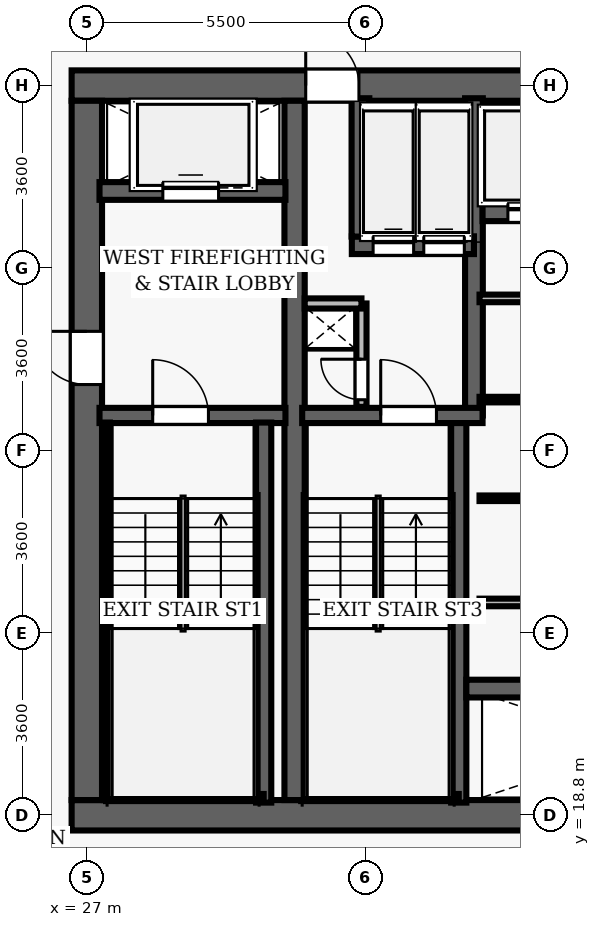
"""IFC4 building model, lengths in metres.
Left out: names, types, materials, properties, quantities, classifications, styles, units other than length and angle.
Written with IfcOpenShell. Run it as: python <this file> out.ifc"""

import sys

from ifc_helpers import new_model, si_unit, direction, frame, frame_2d, origin, place, context, subcontext, project, spatial, rectangle, extrude, element, fill, save


model = new_model("IFC4")
c1 = context("Model", 3, precision=1e-05, world=origin(), true_north=direction((0.0, 1.0)))
c2 = subcontext(c1, "Body", "Model", "MODEL_VIEW")
j1 = project(units=[si_unit("LENGTHUNIT", "METRE"), si_unit("PLANEANGLEUNIT", "RADIAN")], contexts=[c1])
p1 = place(None, origin())
s1 = spatial("IfcSite", under=j1, at=p1, CompositionType="ELEMENT")
p2 = place(p1, origin())
s2 = spatial("IfcBuilding", under=s1, at=p2, CompositionType="ELEMENT")
p3 = place(p2, frame((0.0, 0.0, 48.4)))
s3 = spatial("IfcBuildingStorey", under=s2, at=p3, CompositionType="ELEMENT", Elevation=48.4)
p4 = place(p3, frame((26.7, 18.8, 0.0), z_axis=(0.0, 0.0, 1.0), x_axis=(1.0, 0.0, 0.0)))
e1 = element("IfcWall", 1, at=p4, inside=s3, PredefinedType="SHEAR", context=c2, shape_type="SweptSolid", body=[
    extrude(rectangle(XDim=22.6, YDim=0.6, at=frame_2d((11.3, 0.0))), origin(), (0.0, 0.0, 1.0), 3.5),
])
p5 = place(p4, frame((14.52, 0.0, 0.0)))
e2 = element("IfcOpeningElement", 2, at=p5, cuts=e1, PredefinedType="OPENING", context=c2, shape_type="SweptSolid", body=[
    extrude(rectangle(XDim=1.05, YDim=2.15, at=frame_2d((0.525, 1.075))), frame((0.0, 0.31, 0.0), z_axis=(0.0, -1.0, 0.0), x_axis=(1.0, 0.0, 0.0)), (0.0, 0.0, 1.0), 0.62),
])
p6 = place(p3, frame((26.7, 33.2, 0.0), z_axis=(0.0, 0.0, 1.0), x_axis=(1.0, 0.0, 0.0)))
e3 = element("IfcWall", 3, at=p6, inside=s3, PredefinedType="SHEAR", context=c2, shape_type="SweptSolid", body=[
    extrude(rectangle(XDim=22.6, YDim=0.6, at=frame_2d((11.3, 0.0))), origin(), (0.0, 0.0, 1.0), 3.5),
])
p7 = place(p6, frame((4.62, 0.0, 0.0)))
e4 = element("IfcOpeningElement", 4, at=p7, cuts=e3, PredefinedType="OPENING", context=c2, shape_type="SweptSolid", body=[
    extrude(rectangle(XDim=1.05, YDim=2.15, at=frame_2d((0.525, 1.075))), frame((0.0, 0.31, 0.0), z_axis=(0.0, -1.0, 0.0), x_axis=(1.0, 0.0, 0.0)), (0.0, 0.0, 1.0), 0.62),
])
p8 = place(p6, frame((14.52, 0.0, 0.0)))
e5 = element("IfcOpeningElement", 5, at=p8, cuts=e3, PredefinedType="OPENING", context=c2, shape_type="SweptSolid", body=[
    extrude(rectangle(XDim=1.05, YDim=2.15, at=frame_2d((0.525, 1.075))), frame((0.0, 0.31, 0.0), z_axis=(0.0, -1.0, 0.0), x_axis=(1.0, 0.0, 0.0)), (0.0, 0.0, 1.0), 0.62),
])
p9 = place(p3, frame((27.0, 19.1, 0.0), z_axis=(0.0, 0.0, 1.0), x_axis=(0.0, 1.0, 0.0)))
e6 = element("IfcWall", 6, at=p9, inside=s3, PredefinedType="SHEAR", context=c2, shape_type="SweptSolid", body=[
    extrude(rectangle(XDim=13.8, YDim=0.6, at=frame_2d((6.9, 0.0))), origin(), (0.0, 0.0, 1.0), 3.5),
])
p10 = place(p9, frame((8.2, 0.0, 0.0)))
e7 = element("IfcOpeningElement", 7, at=p10, cuts=e6, PredefinedType="OPENING", context=c2, shape_type="SweptSolid", body=[
    extrude(rectangle(XDim=1.05, YDim=2.15, at=frame_2d((0.525, 1.075))), frame((0.0, 0.31, 0.0), z_axis=(0.0, -1.0, 0.0), x_axis=(1.0, 0.0, 0.0)), (0.0, 0.0, 1.0), 0.62),
])
p11 = place(p3, frame((31.1, 19.1, 0.0), z_axis=(0.0, 0.0, 1.0), x_axis=(0.0, 1.0, 0.0)))
e8 = element("IfcWall", 8, at=p11, inside=s3, PredefinedType="SHEAR", context=c2, shape_type="SweptSolid", body=[
    extrude(rectangle(XDim=13.8, YDim=0.4, at=frame_2d((6.9, 0.0))), origin(), (0.0, 0.0, 1.0), 3.5),
])
p12 = place(p3, frame((27.25, 26.69, 0.0), z_axis=(0.0, 0.0, 1.0), x_axis=(1.0, 0.0, 0.0)))
e9 = element("IfcWall", 9, at=p12, inside=s3, PredefinedType="SHEAR", context=c2, shape_type="SweptSolid", body=[
    extrude(rectangle(XDim=3.67, YDim=0.3, at=frame_2d((1.835, 0.0))), origin(), (0.0, 0.0, 1.0), 3.5),
])
p13 = place(p12, frame((1.05, 0.0, 0.0)))
e10 = element("IfcOpeningElement", 10, at=p13, cuts=e9, PredefinedType="OPENING", context=c2, shape_type="SweptSolid", body=[
    extrude(rectangle(XDim=1.1, YDim=2.15, at=frame_2d((0.55, 1.075))), frame((0.0, 0.16, 0.0), z_axis=(0.0, -1.0, 0.0), x_axis=(1.0, 0.0, 0.0)), (0.0, 0.0, 1.0), 0.32),
])
p14 = place(p3, frame((30.49, 19.05, 0.0), z_axis=(0.0, 0.0, 1.0), x_axis=(0.0, 1.0, 0.0)))
e11 = element("IfcWall", 11, at=p14, inside=s3, PredefinedType="SHEAR", context=c2, shape_type="SweptSolid", body=[
    extrude(rectangle(XDim=7.5, YDim=0.3, at=frame_2d((3.75, 0.0))), origin(), (0.0, 0.0, 1.0), 3.5),
])
p15 = place(p3, frame((27.395, 19.1, 0.0), z_axis=(0.0, 0.0, 1.0), x_axis=(0.0, 1.0, 0.0)))
e12 = element("IfcWall", 12, at=p15, inside=s3, PredefinedType="SHEAR", context=c2, shape_type="SweptSolid", body=[
    extrude(rectangle(XDim=7.45, YDim=0.12, at=frame_2d((3.725, 0.0))), origin(), (0.0, 0.0, 1.0), 3.5),
])
p16 = place(p3, frame((27.395, 19.16, 0.0), z_axis=(0.0, 0.0, 1.0), x_axis=(1.0, 0.0, 0.0)))
e13 = element("IfcWall", 13, at=p16, inside=s3, PredefinedType="SHEAR", context=c2, shape_type="SweptSolid", body=[
    extrude(rectangle(XDim=3.095, YDim=0.12, at=frame_2d((1.547, 0.0))), origin(), (0.0, 0.0, 1.0), 3.5),
])
p17 = place(p3, frame((27.25, 31.12, 0.0), z_axis=(0.0, 0.0, 1.0), x_axis=(1.0, 0.0, 0.0)))
e14 = element("IfcWall", 14, at=p17, inside=s3, PredefinedType="SHEAR", context=c2, shape_type="SweptSolid", body=[
    extrude(rectangle(XDim=3.67, YDim=0.35, at=frame_2d((1.835, 0.0))), origin(), (0.0, 0.0, 1.0), 2.6),
])
p18 = place(p17, frame((1.25, 0.0, 0.0)))
e15 = element("IfcOpeningElement", 15, at=p18, cuts=e14, PredefinedType="OPENING", context=c2, shape_type="SweptSolid", body=[
    extrude(rectangle(XDim=1.1, YDim=2.15, at=frame_2d((0.55, 1.075))), frame((0.0, 0.185, 0.0), z_axis=(0.0, -1.0, 0.0), x_axis=(1.0, 0.0, 0.0)), (0.0, 0.0, 1.0), 0.37),
])
p19 = place(p3, frame((34.34, 19.05, 0.0), z_axis=(0.0, 0.0, 1.0), x_axis=(0.0, 1.0, 0.0)))
e16 = element("IfcWall", 16, at=p19, inside=s3, PredefinedType="SHEAR", context=c2, shape_type="SweptSolid", body=[
    extrude(rectangle(XDim=7.5, YDim=0.3, at=frame_2d((3.75, 0.0))), origin(), (0.0, 0.0, 1.0), 3.5),
])
p20 = place(p3, frame((34.64, 26.69, 0.0), z_axis=(0.0, 0.0, 1.0), x_axis=(0.0, 1.0, 0.0)))
e17 = element("IfcWall", 17, at=p20, inside=s3, PredefinedType="SHEAR", context=c2, shape_type="SweptSolid", body=[
    extrude(rectangle(XDim=6.26, YDim=0.35, at=frame_2d((3.13, 0.0))), origin(), (0.0, 0.0, 1.0), 3.5),
])
p21 = place(p3, frame((31.25, 26.69, 0.0), z_axis=(0.0, 0.0, 1.0), x_axis=(1.0, 0.0, 0.0)))
e18 = element("IfcWall", 18, at=p21, inside=s3, PredefinedType="SHEAR", context=c2, shape_type="SweptSolid", body=[
    extrude(rectangle(XDim=3.56, YDim=0.3, at=frame_2d((1.78, 0.0))), origin(), (0.0, 0.0, 1.0), 3.5),
])
p22 = place(p21, frame((1.55, 0.0, 0.0)))
e19 = element("IfcOpeningElement", 19, at=p22, cuts=e18, PredefinedType="OPENING", context=c2, shape_type="SweptSolid", body=[
    extrude(rectangle(XDim=1.1, YDim=2.15, at=frame_2d((0.55, 1.075))), frame((0.0, 0.16, 0.0), z_axis=(0.0, -1.0, 0.0), x_axis=(1.0, 0.0, 0.0)), (0.0, 0.0, 1.0), 0.32),
])
p23 = place(p3, frame((31.3, 19.16, 0.0), z_axis=(0.0, 0.0, 1.0), x_axis=(1.0, 0.0, 0.0)))
e20 = element("IfcWall", 20, at=p23, inside=s3, PredefinedType="SHEAR", context=c2, shape_type="SweptSolid", body=[
    extrude(rectangle(XDim=3.04, YDim=0.12, at=frame_2d((1.52, 0.0))), origin(), (0.0, 0.0, 1.0), 3.5),
])
p24 = place(p3, frame((32.23, 30.05, 0.0), z_axis=(0.0, 0.0, 1.0), x_axis=(1.0, 0.0, 0.0)))
e21 = element("IfcWall", 21, at=p24, inside=s3, PredefinedType="SHEAR", context=c2, shape_type="SweptSolid", body=[
    extrude(rectangle(XDim=2.41, YDim=0.35, at=frame_2d((1.205, 0.0))), origin(), (0.0, 0.0, 1.0), 2.6),
])
p25 = place(p24, frame((0.42, 0.0, 0.0)))
e22 = element("IfcOpeningElement", 22, at=p25, cuts=e21, PredefinedType="OPENING", context=c2, shape_type="SweptSolid", body=[
    extrude(rectangle(XDim=0.8, YDim=2.15, at=frame_2d((0.4, 1.075))), frame((0.0, 0.185, 0.0), z_axis=(0.0, -1.0, 0.0), x_axis=(1.0, 0.0, 0.0)), (0.0, 0.0, 1.0), 0.37),
])
p26 = place(p24, frame((1.42, 0.0, 0.0)))
e23 = element("IfcOpeningElement", 23, at=p26, cuts=e21, PredefinedType="OPENING", context=c2, shape_type="SweptSolid", body=[
    extrude(rectangle(XDim=0.8, YDim=2.15, at=frame_2d((0.4, 1.075))), frame((0.0, 0.185, 0.0), z_axis=(0.0, -1.0, 0.0), x_axis=(1.0, 0.0, 0.0)), (0.0, 0.0, 1.0), 0.37),
])
p27 = place(p3, frame((32.4, 30.22, 0.0), z_axis=(0.0, 0.0, 1.0), x_axis=(0.0, 1.0, 0.0)))
e24 = element("IfcWall", 24, at=p27, inside=s3, PredefinedType="SHEAR", context=c2, shape_type="SweptSolid", body=[
    extrude(rectangle(XDim=2.73, YDim=0.35, at=frame_2d((1.365, 0.0))), origin(), (0.0, 0.0, 1.0), 2.6),
])
p28 = place(p3, frame((32.42, 26.86, 0.0), z_axis=(0.0, 0.0, 1.0), x_axis=(0.0, 1.0, 0.0)))
e25 = element("IfcWall", 25, at=p28, inside=s3, PredefinedType="PARTITIONING", context=c2, shape_type="SweptSolid", body=[
    extrude(rectangle(XDim=2.04, YDim=0.2, at=frame_2d((1.02, 0.0))), origin(), (0.0, 0.0, 1.0), 2.6),
])
p29 = place(p28, frame((0.14, 0.0, 0.0)))
e26 = element("IfcOpeningElement", 26, at=p29, cuts=e25, PredefinedType="OPENING", context=c2, shape_type="SweptSolid", body=[
    extrude(rectangle(XDim=0.8, YDim=2.05, at=frame_2d((0.4, 1.025))), frame((0.0, 0.11, 0.0), z_axis=(0.0, -1.0, 0.0), x_axis=(1.0, 0.0, 0.0)), (0.0, 0.0, 1.0), 0.22),
])
p30 = place(p3, frame((31.3, 28.9, 0.0), z_axis=(0.0, 0.0, 1.0), x_axis=(1.0, 0.0, 0.0)))
e27 = element("IfcWall", 27, at=p30, inside=s3, PredefinedType="PARTITIONING", context=c2, shape_type="SweptSolid", body=[
    extrude(rectangle(XDim=1.12, YDim=0.2, at=frame_2d((0.56, 0.0))), origin(), (0.0, 0.0, 1.0), 2.6),
])
p31 = place(p3, frame((34.81, 30.7, 0.0), z_axis=(0.0, 0.0, 1.0), x_axis=(1.0, 0.0, 0.0)))
e28 = element("IfcWall", 28, at=p31, inside=s3, PredefinedType="SHEAR", context=c2, shape_type="SweptSolid", body=[
    extrude(rectangle(XDim=6.36, YDim=0.35, at=frame_2d((3.18, 0.0))), origin(), (0.0, 0.0, 1.0), 2.6),
])
p32 = place(p31, frame((0.5, 0.0, 0.0)))
e29 = element("IfcOpeningElement", 29, at=p32, cuts=e28, PredefinedType="OPENING", context=c2, shape_type="SweptSolid", body=[
    extrude(rectangle(XDim=0.9, YDim=2.15, at=frame_2d((0.45, 1.075))), frame((0.0, 0.185, 0.0), z_axis=(0.0, -1.0, 0.0), x_axis=(1.0, 0.0, 0.0)), (0.0, 0.0, 1.0), 0.37),
])
p33 = place(p31, frame((2.58, 0.0, 0.0)))
e30 = element("IfcOpeningElement", 30, at=p33, cuts=e28, PredefinedType="OPENING", context=c2, shape_type="SweptSolid", body=[
    extrude(rectangle(XDim=0.9, YDim=2.15, at=frame_2d((0.45, 1.075))), frame((0.0, 0.185, 0.0), z_axis=(0.0, -1.0, 0.0), x_axis=(1.0, 0.0, 0.0)), (0.0, 0.0, 1.0), 0.37),
])
p34 = place(p31, frame((4.66, 0.0, 0.0)))
e31 = element("IfcOpeningElement", 31, at=p34, cuts=e28, PredefinedType="OPENING", context=c2, shape_type="SweptSolid", body=[
    extrude(rectangle(XDim=0.9, YDim=2.15, at=frame_2d((0.45, 1.075))), frame((0.0, 0.185, 0.0), z_axis=(0.0, -1.0, 0.0), x_axis=(1.0, 0.0, 0.0)), (0.0, 0.0, 1.0), 0.37),
])
p35 = place(p3, frame((34.49, 21.3, 0.0), z_axis=(0.0, 0.0, 1.0), x_axis=(1.0, 0.0, 0.0)))
e32 = element("IfcWall", 32, at=p35, inside=s3, PredefinedType="SHEAR", context=c2, shape_type="SweptSolid", body=[
    extrude(rectangle(XDim=6.68, YDim=0.35, at=frame_2d((3.34, 0.0))), origin(), (0.0, 0.0, 1.0), 2.6),
])
for number, where, z_axis, x_axis in (
    (33, (34.75, 29.0, 0.0), (0.0, 0.0, 1.0), (1.0, 0.0, 0.0)),
    (34, (34.75, 23.0, 0.0), (0.0, 0.0, 1.0), (1.0, 0.0, 0.0)),
):
    element("IfcWall", number, at=place(p3, frame(where, z_axis=z_axis, x_axis=x_axis)), inside=s3, PredefinedType="PARTITIONING", context=c2, shape_type="SweptSolid", body=[
        extrude(rectangle(XDim=6.25, YDim=0.15, at=frame_2d((3.125, 0.0))), origin(), (0.0, 0.0, 1.0), 2.6),
    ])
for number, where, z_axis, x_axis in (
    (35, (34.75, 25.056, 0.0), (0.0, 0.0, 1.0), (1.0, 0.0, 0.0)),
    (36, (34.75, 27.003, 0.0), (0.0, 0.0, 1.0), (1.0, 0.0, 0.0)),
):
    element("IfcWall", number, at=place(p3, frame(where, z_axis=z_axis, x_axis=x_axis)), inside=s3, PredefinedType="PARTITIONING", context=c2, shape_type="SweptSolid", body=[
        extrude(rectangle(XDim=6.25, YDim=0.11, at=frame_2d((3.125, 0.0))), origin(), (0.0, 0.0, 1.0), 2.6),
    ])
p36 = place(p13, origin())
e37 = element("IfcDoor", 37, at=p36, inside=s3, OperationType="SINGLE_SWING_LEFT", PredefinedType="DOOR", context=c2, shape_type="SweptSolid", body=[
    extrude(rectangle(XDim=1.1, YDim=2.15, at=frame_2d((0.55, 1.075))), frame((0.0, 0.025, 0.0), z_axis=(0.0, -1.0, 0.0), x_axis=(1.0, 0.0, 0.0)), (0.0, 0.0, 1.0), 0.05),
])
fill(e10, e37)
p37 = place(p10, origin())
e38 = element("IfcDoor", 38, at=p37, inside=s3, OperationType="SINGLE_SWING_RIGHT", PredefinedType="DOOR", context=c2, shape_type="SweptSolid", body=[
    extrude(rectangle(XDim=1.05, YDim=2.15, at=frame_2d((0.525, 1.075))), frame((0.0, 0.025, 0.0), z_axis=(0.0, -1.0, 0.0), x_axis=(1.0, 0.0, 0.0)), (0.0, 0.0, 1.0), 0.05),
])
fill(e7, e38)
p38 = place(p22, origin())
e39 = element("IfcDoor", 39, at=p38, inside=s3, OperationType="SINGLE_SWING_LEFT", PredefinedType="DOOR", context=c2, shape_type="SweptSolid", body=[
    extrude(rectangle(XDim=1.1, YDim=2.15, at=frame_2d((0.55, 1.075))), frame((0.0, 0.025, 0.0), z_axis=(0.0, -1.0, 0.0), x_axis=(1.0, 0.0, 0.0)), (0.0, 0.0, 1.0), 0.05),
])
fill(e19, e39)
p39 = place(p29, origin())
e40 = element("IfcDoor", 40, at=p39, inside=s3, OperationType="SINGLE_SWING_RIGHT", PredefinedType="DOOR", context=c2, shape_type="SweptSolid", body=[
    extrude(rectangle(XDim=0.8, YDim=2.05, at=frame_2d((0.4, 1.025))), frame((0.0, 0.025, 0.0), z_axis=(0.0, -1.0, 0.0), x_axis=(1.0, 0.0, 0.0)), (0.0, 0.0, 1.0), 0.05),
])
fill(e26, e40)
p40 = place(p7, origin())
e41 = element("IfcDoor", 41, at=p40, inside=s3, OperationType="SINGLE_SWING_LEFT", PredefinedType="DOOR", context=c2, shape_type="SweptSolid", body=[
    extrude(rectangle(XDim=1.05, YDim=2.15, at=frame_2d((0.525, 1.075))), frame((0.0, 0.025, 0.0), z_axis=(0.0, -1.0, 0.0), x_axis=(1.0, 0.0, 0.0)), (0.0, 0.0, 1.0), 0.05),
])
fill(e4, e41)
p41 = place(p32, origin())
e42 = element("IfcDoor", 42, at=p41, inside=s3, OperationType="SLIDING_TO_LEFT", PredefinedType="DOOR", context=c2, shape_type="SweptSolid", body=[
    extrude(rectangle(XDim=0.9, YDim=2.15, at=frame_2d((0.45, 1.075))), frame((0.0, 0.025, 0.0), z_axis=(0.0, -1.0, 0.0), x_axis=(1.0, 0.0, 0.0)), (0.0, 0.0, 1.0), 0.05),
])
fill(e29, e42)
p42 = place(p18, origin())
e43 = element("IfcDoor", 43, at=p42, inside=s3, OperationType="SLIDING_TO_LEFT", PredefinedType="DOOR", context=c2, shape_type="SweptSolid", body=[
    extrude(rectangle(XDim=1.1, YDim=2.15, at=frame_2d((0.55, 1.075))), frame((0.0, 0.025, 0.0), z_axis=(0.0, -1.0, 0.0), x_axis=(1.0, 0.0, 0.0)), (0.0, 0.0, 1.0), 0.05),
])
fill(e15, e43)
p43 = place(p25, origin())
e44 = element("IfcDoor", 44, at=p43, inside=s3, OperationType="SLIDING_TO_LEFT", PredefinedType="DOOR", context=c2, shape_type="SweptSolid", body=[
    extrude(rectangle(XDim=0.8, YDim=2.15, at=frame_2d((0.4, 1.075))), frame((0.0, 0.025, 0.0), z_axis=(0.0, -1.0, 0.0), x_axis=(1.0, 0.0, 0.0)), (0.0, 0.0, 1.0), 0.05),
])
fill(e22, e44)
p44 = place(p26, origin())
e45 = element("IfcDoor", 45, at=p44, inside=s3, OperationType="SLIDING_TO_LEFT", PredefinedType="DOOR", context=c2, shape_type="SweptSolid", body=[
    extrude(rectangle(XDim=0.8, YDim=2.15, at=frame_2d((0.4, 1.075))), frame((0.0, 0.025, 0.0), z_axis=(0.0, -1.0, 0.0), x_axis=(1.0, 0.0, 0.0)), (0.0, 0.0, 1.0), 0.05),
])
fill(e23, e45)
save(model, sys.argv[1])
